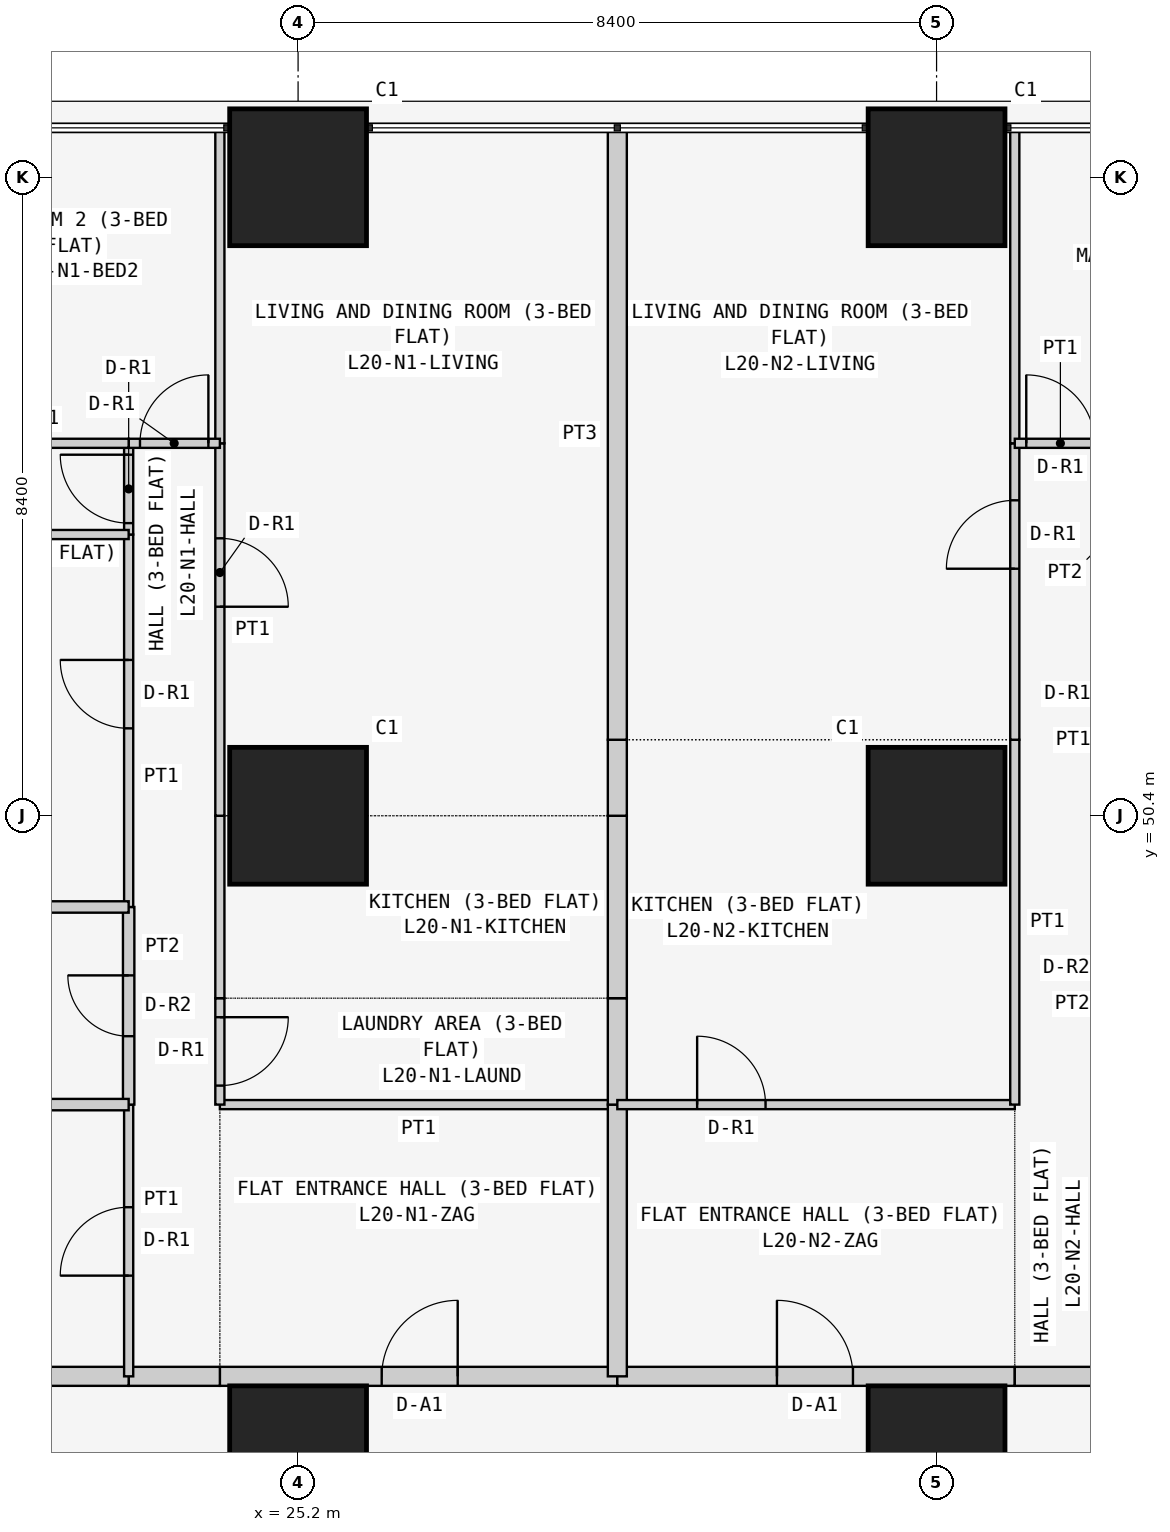
"""IFC4 building model, lengths in metres.
Left out: names, types, materials, properties, quantities, classifications, styles, units other than length and angle.
Written with IfcOpenShell. Run it as: python <this file> out.ifc"""

import sys

from ifc_helpers import new_model, si_unit, direction, frame, frame_2d, origin, origin_2d, place, context, subcontext, project, spatial, rectangle, extrude, element, fill, save


model = new_model("IFC4")
c1 = context("Model", 3, precision=1e-05, world=origin(), true_north=direction((0.0, 1.0)))
c2 = subcontext(c1, "Body", "Model", "MODEL_VIEW")
j1 = project(units=[si_unit("LENGTHUNIT", "METRE"), si_unit("PLANEANGLEUNIT", "RADIAN")], contexts=[c1])
p1 = place(None, origin())
s1 = spatial("IfcSite", under=j1, at=p1, CompositionType="ELEMENT")
p2 = place(p1, origin())
s2 = spatial("IfcBuilding", under=s1, at=p2, CompositionType="ELEMENT")
p3 = place(p2, frame((0.0, 0.0, 81.3)))
s3 = spatial("IfcBuildingStorey", under=s2, at=p3, CompositionType="ELEMENT", Elevation=81.3)
for number, where, z_axis, x_axis in (
    (1, (25.2, 42.0, 0.0), (0.0, 0.0, 1.0), (1.0, 0.0, 0.0)),
    (2, (25.2, 50.4, 0.0), (0.0, 0.0, 1.0), (1.0, 0.0, 0.0)),
    (3, (25.2, 58.8, 0.0), (0.0, 0.0, 1.0), (1.0, 0.0, 0.0)),
    (4, (33.6, 42.0, 0.0), (0.0, 0.0, 1.0), (1.0, 0.0, 0.0)),
    (5, (33.6, 50.4, 0.0), (0.0, 0.0, 1.0), (1.0, 0.0, 0.0)),
    (6, (33.6, 58.8, 0.0), (0.0, 0.0, 1.0), (1.0, 0.0, 0.0)),
):
    element("IfcColumn", number, at=place(p3, frame(where, z_axis=z_axis, x_axis=x_axis)), inside=s3, PredefinedType="COLUMN", context=c2, shape_type="SweptSolid", body=[
        extrude(rectangle(XDim=1.8, YDim=1.8, at=origin_2d()), origin(), (0.0, 0.0, 1.0), 3.6),
    ])
p4 = place(p3, frame((24.171, 43.025, 0.0), z_axis=(0.0, 0.0, 1.0), x_axis=(1.0, 0.0, 0.0)))
e7 = element("IfcWall", 7, at=p4, inside=s3, PredefinedType="PARTITIONING", context=c2, shape_type="SweptSolid", body=[
    extrude(rectangle(XDim=5.229, YDim=0.25, at=frame_2d((2.615, 0.0))), origin(), (0.0, 0.0, 1.0), 3.45),
])
p5 = place(p4, frame((2.129, 0.0, 0.0)))
e8 = element("IfcOpeningElement", 8, at=p5, cuts=e7, PredefinedType="OPENING", context=c2, shape_type="SweptSolid", body=[
    extrude(rectangle(XDim=1.0, YDim=2.1, at=frame_2d((0.5, 1.05))), frame((0.0, 0.135, 0.0), z_axis=(0.0, -1.0, 0.0), x_axis=(1.0, 0.0, 0.0)), (0.0, 0.0, 1.0), 0.27),
])
p6 = place(p3, frame((22.971, 43.025, 0.0), z_axis=(0.0, 0.0, 1.0), x_axis=(1.0, 0.0, 0.0)))
e9 = element("IfcWall", 9, at=p6, inside=s3, PredefinedType="PARTITIONING", context=c2, shape_type="SweptSolid", body=[
    extrude(rectangle(XDim=1.2, YDim=0.25, at=frame_2d((0.6, 0.0))), origin(), (0.0, 0.0, 1.0), 3.45),
])
p7 = place(p3, frame((16.1, 43.025, 0.0), z_axis=(0.0, 0.0, 1.0), x_axis=(1.0, 0.0, 0.0)))
e10 = element("IfcWall", 10, at=p7, inside=s3, PredefinedType="PARTITIONING", context=c2, shape_type="SweptSolid", body=[
    extrude(rectangle(XDim=6.871, YDim=0.25, at=frame_2d((3.436, 0.0))), origin(), (0.0, 0.0, 1.0), 3.45),
])
p8 = place(p3, frame((29.4, 43.025, 0.0), z_axis=(0.0, 0.0, 1.0), x_axis=(1.0, 0.0, 0.0)))
e11 = element("IfcWall", 11, at=p8, inside=s3, PredefinedType="PARTITIONING", context=c2, shape_type="SweptSolid", body=[
    extrude(rectangle(XDim=5.229, YDim=0.25, at=frame_2d((2.615, 0.0))), origin(), (0.0, 0.0, 1.0), 3.45),
])
p9 = place(p8, frame((2.1, 0.0, 0.0)))
e12 = element("IfcOpeningElement", 12, at=p9, cuts=e11, PredefinedType="OPENING", context=c2, shape_type="SweptSolid", body=[
    extrude(rectangle(XDim=1.0, YDim=2.1, at=frame_2d((0.5, 1.05))), frame((0.0, 0.135, 0.0), z_axis=(0.0, -1.0, 0.0), x_axis=(1.0, 0.0, 0.0)), (0.0, 0.0, 1.0), 0.27),
])
p10 = place(p3, frame((34.629, 43.025, 0.0), z_axis=(0.0, 0.0, 1.0), x_axis=(1.0, 0.0, 0.0)))
e13 = element("IfcWall", 13, at=p10, inside=s3, PredefinedType="PARTITIONING", context=c2, shape_type="SweptSolid", body=[
    extrude(rectangle(XDim=1.2, YDim=0.25, at=frame_2d((0.6, 0.0))), origin(), (0.0, 0.0, 1.0), 3.45),
])
p11 = place(p3, frame((29.4, 46.6, 0.0), z_axis=(0.0, 0.0, 1.0), x_axis=(-1.0, 0.0, 0.0)))
e14 = element("IfcWall", 14, at=p11, inside=s3, PredefinedType="PARTITIONING", context=c2, shape_type="SweptSolid", body=[
    extrude(rectangle(XDim=5.229, YDim=0.12, at=frame_2d((2.615, 0.0))), origin(), (0.0, 0.0, 1.0), 3.45),
])
p12 = place(p3, frame((29.4, 43.025, 0.0), z_axis=(0.0, 0.0, 1.0), x_axis=(0.0, 1.0, 0.0)))
e15 = element("IfcWall", 15, at=p12, inside=s3, PredefinedType="PARTITIONING", context=c2, shape_type="SweptSolid", body=[
    extrude(rectangle(XDim=3.575, YDim=0.25, at=frame_2d((1.788, 0.0))), origin(), (0.0, 0.0, 1.0), 2.848),
])
p13 = place(p3, frame((24.171, 48.0, 0.0), z_axis=(0.0, 0.0, 1.0), x_axis=(0.0, -1.0, 0.0)))
e16 = element("IfcWall", 16, at=p13, inside=s3, PredefinedType="PARTITIONING", context=c2, shape_type="SweptSolid", body=[
    extrude(rectangle(XDim=1.4, YDim=0.12, at=frame_2d((0.7, 0.0))), origin(), (0.0, 0.0, 1.0), 3.45),
])
p14 = place(p13, frame((0.25, 0.0, 0.0)))
e17 = element("IfcOpeningElement", 17, at=p14, cuts=e16, PredefinedType="OPENING", context=c2, shape_type="SweptSolid", body=[
    extrude(rectangle(XDim=0.9, YDim=2.1, at=frame_2d((0.45, 1.05))), frame((0.0, 0.07, 0.0), z_axis=(0.0, -1.0, 0.0), x_axis=(1.0, 0.0, 0.0)), (0.0, 0.0, 1.0), 0.14),
])
p15 = place(p3, frame((29.4, 46.6, 0.0), z_axis=(0.0, 0.0, 1.0), x_axis=(0.0, 1.0, 0.0)))
e18 = element("IfcWall", 18, at=p15, inside=s3, PredefinedType="PARTITIONING", context=c2, shape_type="SweptSolid", body=[
    extrude(rectangle(XDim=1.4, YDim=0.25, at=frame_2d((0.7, 0.0))), origin(), (0.0, 0.0, 1.0), 2.848),
])
p16 = place(p3, frame((24.171, 50.4, 0.0), z_axis=(0.0, 0.0, 1.0), x_axis=(0.0, -1.0, 0.0)))
e19 = element("IfcWall", 19, at=p16, inside=s3, PredefinedType="PARTITIONING", context=c2, shape_type="SweptSolid", body=[
    extrude(rectangle(XDim=2.4, YDim=0.12, at=frame_2d((1.2, 0.0))), origin(), (0.0, 0.0, 1.0), 3.45),
])
p17 = place(p3, frame((29.4, 48.0, 0.0), z_axis=(0.0, 0.0, 1.0), x_axis=(0.0, 1.0, 0.0)))
e20 = element("IfcWall", 20, at=p17, inside=s3, PredefinedType="PARTITIONING", context=c2, shape_type="SweptSolid", body=[
    extrude(rectangle(XDim=2.4, YDim=0.25, at=frame_2d((1.2, 0.0))), origin(), (0.0, 0.0, 1.0), 2.848),
])
p18 = place(p3, frame((24.171, 55.3, 0.0), z_axis=(0.0, 0.0, 1.0), x_axis=(0.0, -1.0, 0.0)))
e21 = element("IfcWall", 21, at=p18, inside=s3, PredefinedType="PARTITIONING", context=c2, shape_type="SweptSolid", body=[
    extrude(rectangle(XDim=4.9, YDim=0.12, at=frame_2d((2.45, 0.0))), origin(), (0.0, 0.0, 1.0), 3.45),
])
p19 = place(p18, frame((1.25, 0.0, 0.0)))
e22 = element("IfcOpeningElement", 22, at=p19, cuts=e21, PredefinedType="OPENING", context=c2, shape_type="SweptSolid", body=[
    extrude(rectangle(XDim=0.9, YDim=2.1, at=frame_2d((0.45, 1.05))), frame((0.0, 0.07, 0.0), z_axis=(0.0, -1.0, 0.0), x_axis=(1.0, 0.0, 0.0)), (0.0, 0.0, 1.0), 0.14),
])
p20 = place(p3, frame((24.171, 59.45, 0.0), z_axis=(0.0, 0.0, 1.0), x_axis=(0.0, -1.0, 0.0)))
e23 = element("IfcWall", 23, at=p20, inside=s3, PredefinedType="PARTITIONING", context=c2, shape_type="SweptSolid", body=[
    extrude(rectangle(XDim=4.15, YDim=0.12, at=frame_2d((2.075, 0.0))), origin(), (0.0, 0.0, 1.0), 3.45),
])
p21 = place(p3, frame((29.4, 50.4, 0.0), z_axis=(0.0, 0.0, 1.0), x_axis=(0.0, 1.0, 0.0)))
e24 = element("IfcWall", 24, at=p21, inside=s3, PredefinedType="PARTITIONING", context=c2, shape_type="SweptSolid", body=[
    extrude(rectangle(XDim=1.0, YDim=0.25, at=frame_2d((0.5, 0.0))), origin(), (0.0, 0.0, 1.0), 2.848),
])
p22 = place(p3, frame((29.4, 51.4, 0.0), z_axis=(0.0, 0.0, 1.0), x_axis=(0.0, 1.0, 0.0)))
e25 = element("IfcWall", 25, at=p22, inside=s3, PredefinedType="PARTITIONING", context=c2, shape_type="SweptSolid", body=[
    extrude(rectangle(XDim=8.05, YDim=0.25, at=frame_2d((4.025, 0.0))), origin(), (0.0, 0.0, 1.0), 2.848),
])
p23 = place(p3, frame((22.971, 46.6, 0.0), z_axis=(0.0, 0.0, 1.0), x_axis=(0.0, -1.0, 0.0)))
e26 = element("IfcWall", 26, at=p23, inside=s3, PredefinedType="PARTITIONING", context=c2, shape_type="SweptSolid", body=[
    extrude(rectangle(XDim=3.575, YDim=0.12, at=frame_2d((1.788, 0.0))), origin(), (0.0, 0.0, 1.0), 3.45),
])
p24 = place(p23, frame((1.35, 0.0, 0.0)))
e27 = element("IfcOpeningElement", 27, at=p24, cuts=e26, PredefinedType="OPENING", context=c2, shape_type="SweptSolid", body=[
    extrude(rectangle(XDim=0.9, YDim=2.1, at=frame_2d((0.45, 1.05))), frame((0.0, 0.07, 0.0), z_axis=(0.0, -1.0, 0.0), x_axis=(1.0, 0.0, 0.0)), (0.0, 0.0, 1.0), 0.14),
])
p25 = place(p3, frame((22.971, 49.2, 0.0), z_axis=(0.0, 0.0, 1.0), x_axis=(0.0, -1.0, 0.0)))
e28 = element("IfcWall", 28, at=p25, inside=s3, PredefinedType="PARTITIONING", context=c2, shape_type="SweptSolid", body=[
    extrude(rectangle(XDim=2.6, YDim=0.15, at=frame_2d((1.3, 0.0))), origin(), (0.0, 0.0, 1.0), 3.45),
])
p26 = place(p25, frame((0.9, 0.0, 0.0)))
e29 = element("IfcOpeningElement", 29, at=p26, cuts=e28, PredefinedType="OPENING", context=c2, shape_type="SweptSolid", body=[
    extrude(rectangle(XDim=0.8, YDim=2.1, at=frame_2d((0.4, 1.05))), frame((0.0, 0.085, 0.0), z_axis=(0.0, -1.0, 0.0), x_axis=(1.0, 0.0, 0.0)), (0.0, 0.0, 1.0), 0.17),
])
p27 = place(p3, frame((22.971, 54.1, 0.0), z_axis=(0.0, 0.0, 1.0), x_axis=(0.0, -1.0, 0.0)))
e30 = element("IfcWall", 30, at=p27, inside=s3, PredefinedType="PARTITIONING", context=c2, shape_type="SweptSolid", body=[
    extrude(rectangle(XDim=4.9, YDim=0.12, at=frame_2d((2.45, 0.0))), origin(), (0.0, 0.0, 1.0), 3.45),
])
p28 = place(p27, frame((1.65, 0.0, 0.0)))
e31 = element("IfcOpeningElement", 31, at=p28, cuts=e30, PredefinedType="OPENING", context=c2, shape_type="SweptSolid", body=[
    extrude(rectangle(XDim=0.9, YDim=2.1, at=frame_2d((0.45, 1.05))), frame((0.0, 0.07, 0.0), z_axis=(0.0, -1.0, 0.0), x_axis=(1.0, 0.0, 0.0)), (0.0, 0.0, 1.0), 0.14),
])
p29 = place(p3, frame((22.971, 55.3, 0.0), z_axis=(0.0, 0.0, 1.0), x_axis=(0.0, -1.0, 0.0)))
e32 = element("IfcWall", 32, at=p29, inside=s3, PredefinedType="PARTITIONING", context=c2, shape_type="SweptSolid", body=[
    extrude(rectangle(XDim=1.2, YDim=0.12, at=frame_2d((0.6, 0.0))), origin(), (0.0, 0.0, 1.0), 3.45),
])
p30 = place(p29, frame((0.15, 0.0, 0.0)))
e33 = element("IfcOpeningElement", 33, at=p30, cuts=e32, PredefinedType="OPENING", context=c2, shape_type="SweptSolid", body=[
    extrude(rectangle(XDim=0.9, YDim=2.1, at=frame_2d((0.45, 1.05))), frame((0.0, 0.07, 0.0), z_axis=(0.0, -1.0, 0.0), x_axis=(1.0, 0.0, 0.0)), (0.0, 0.0, 1.0), 0.14),
])
p31 = place(p3, frame((24.171, 55.3, 0.0), z_axis=(0.0, 0.0, 1.0), x_axis=(-1.0, 0.0, 0.0)))
e34 = element("IfcWall", 34, at=p31, inside=s3, PredefinedType="PARTITIONING", context=c2, shape_type="SweptSolid", body=[
    extrude(rectangle(XDim=1.2, YDim=0.12, at=frame_2d((0.6, 0.0))), origin(), (0.0, 0.0, 1.0), 3.45),
])
p32 = place(p31, frame((0.151, 0.0, 0.0)))
e35 = element("IfcOpeningElement", 35, at=p32, cuts=e34, PredefinedType="OPENING", context=c2, shape_type="SweptSolid", body=[
    extrude(rectangle(XDim=0.9, YDim=2.1, at=frame_2d((0.45, 1.05))), frame((0.0, 0.07, 0.0), z_axis=(0.0, -1.0, 0.0), x_axis=(1.0, 0.0, 0.0)), (0.0, 0.0, 1.0), 0.14),
])
for number, where, z_axis, x_axis in (
    (36, (22.971, 46.6, 0.0), (0.0, 0.0, 1.0), (-1.0, 0.0, 0.0)),
    (37, (22.971, 49.2, 0.0), (0.0, 0.0, 1.0), (-1.0, 0.0, 0.0)),
):
    element("IfcWall", number, at=place(p3, frame(where, z_axis=z_axis, x_axis=x_axis)), inside=s3, PredefinedType="PARTITIONING", context=c2, shape_type="SweptSolid", body=[
        extrude(rectangle(XDim=2.971, YDim=0.15, at=frame_2d((1.485, 0.0))), origin(), (0.0, 0.0, 1.0), 3.45),
    ])
for number, where, z_axis, x_axis in (
    (38, (22.971, 54.1, 0.0), (0.0, 0.0, 1.0), (-1.0, 0.0, 0.0)),
    (39, (22.971, 55.3, 0.0), (0.0, 0.0, 1.0), (-1.0, 0.0, 0.0)),
):
    element("IfcWall", number, at=place(p3, frame(where, z_axis=z_axis, x_axis=x_axis)), inside=s3, PredefinedType="PARTITIONING", context=c2, shape_type="SweptSolid", body=[
        extrude(rectangle(XDim=2.285, YDim=0.12, at=frame_2d((1.143, 0.0))), origin(), (0.0, 0.0, 1.0), 3.45),
    ])
p33 = place(p3, frame((29.4, 46.6, 0.0), z_axis=(0.0, 0.0, 1.0), x_axis=(1.0, 0.0, 0.0)))
e40 = element("IfcWall", 40, at=p33, inside=s3, PredefinedType="PARTITIONING", context=c2, shape_type="SweptSolid", body=[
    extrude(rectangle(XDim=5.229, YDim=0.12, at=frame_2d((2.615, 0.0))), origin(), (0.0, 0.0, 1.0), 3.45),
])
p34 = place(p33, frame((1.05, 0.0, 0.0)))
e41 = element("IfcOpeningElement", 41, at=p34, cuts=e40, PredefinedType="OPENING", context=c2, shape_type="SweptSolid", body=[
    extrude(rectangle(XDim=0.9, YDim=2.1, at=frame_2d((0.45, 1.05))), frame((0.0, 0.07, 0.0), z_axis=(0.0, -1.0, 0.0), x_axis=(1.0, 0.0, 0.0)), (0.0, 0.0, 1.0), 0.14),
])
p35 = place(p3, frame((34.629, 51.4, 0.0), z_axis=(0.0, 0.0, 1.0), x_axis=(0.0, -1.0, 0.0)))
e42 = element("IfcWall", 42, at=p35, inside=s3, PredefinedType="PARTITIONING", context=c2, shape_type="SweptSolid", body=[
    extrude(rectangle(XDim=4.8, YDim=0.12, at=frame_2d((2.4, 0.0))), origin(), (0.0, 0.0, 1.0), 3.45),
])
p36 = place(p3, frame((34.629, 55.3, 0.0), z_axis=(0.0, 0.0, 1.0), x_axis=(0.0, -1.0, 0.0)))
e43 = element("IfcWall", 43, at=p36, inside=s3, PredefinedType="PARTITIONING", context=c2, shape_type="SweptSolid", body=[
    extrude(rectangle(XDim=3.9, YDim=0.12, at=frame_2d((1.95, 0.0))), origin(), (0.0, 0.0, 1.0), 3.45),
])
p37 = place(p36, frame((0.75, 0.0, 0.0)))
e44 = element("IfcOpeningElement", 44, at=p37, cuts=e43, PredefinedType="OPENING", context=c2, shape_type="SweptSolid", body=[
    extrude(rectangle(XDim=0.9, YDim=2.1, at=frame_2d((0.45, 1.05))), frame((0.0, 0.07, 0.0), z_axis=(0.0, -1.0, 0.0), x_axis=(1.0, 0.0, 0.0)), (0.0, 0.0, 1.0), 0.14),
])
p38 = place(p3, frame((34.629, 59.45, 0.0), z_axis=(0.0, 0.0, 1.0), x_axis=(0.0, -1.0, 0.0)))
e45 = element("IfcWall", 45, at=p38, inside=s3, PredefinedType="PARTITIONING", context=c2, shape_type="SweptSolid", body=[
    extrude(rectangle(XDim=4.15, YDim=0.12, at=frame_2d((2.075, 0.0))), origin(), (0.0, 0.0, 1.0), 3.45),
])
p39 = place(p3, frame((34.629, 55.3, 0.0), z_axis=(0.0, 0.0, 1.0), x_axis=(1.0, 0.0, 0.0)))
e46 = element("IfcWall", 46, at=p39, inside=s3, PredefinedType="PARTITIONING", context=c2, shape_type="SweptSolid", body=[
    extrude(rectangle(XDim=1.2, YDim=0.12, at=frame_2d((0.6, 0.0))), origin(), (0.0, 0.0, 1.0), 3.45),
])
p40 = place(p39, frame((0.151, 0.0, 0.0)))
e47 = element("IfcOpeningElement", 47, at=p40, cuts=e46, PredefinedType="OPENING", context=c2, shape_type="SweptSolid", body=[
    extrude(rectangle(XDim=0.9, YDim=2.1, at=frame_2d((0.45, 1.05))), frame((0.0, 0.07, 0.0), z_axis=(0.0, -1.0, 0.0), x_axis=(1.0, 0.0, 0.0)), (0.0, 0.0, 1.0), 0.14),
])
p41 = place(p5, origin())
e48 = element("IfcDoor", 48, at=p41, inside=s3, OperationType="SINGLE_SWING_RIGHT", PredefinedType="DOOR", context=c2, shape_type="SweptSolid", body=[
    extrude(rectangle(XDim=1.0, YDim=2.1, at=frame_2d((0.5, 1.05))), frame((0.0, 0.025, 0.0), z_axis=(0.0, -1.0, 0.0), x_axis=(1.0, 0.0, 0.0)), (0.0, 0.0, 1.0), 0.05),
])
fill(e8, e48)
p42 = place(p14, origin())
e49 = element("IfcDoor", 49, at=p42, inside=s3, OperationType="SINGLE_SWING_LEFT", PredefinedType="DOOR", context=c2, shape_type="SweptSolid", body=[
    extrude(rectangle(XDim=0.9, YDim=2.1, at=frame_2d((0.45, 1.05))), frame((0.0, 0.025, 0.0), z_axis=(0.0, -1.0, 0.0), x_axis=(1.0, 0.0, 0.0)), (0.0, 0.0, 1.0), 0.05),
])
fill(e17, e49)
p43 = place(p19, origin())
e50 = element("IfcDoor", 50, at=p43, inside=s3, OperationType="SINGLE_SWING_RIGHT", PredefinedType="DOOR", context=c2, shape_type="SweptSolid", body=[
    extrude(rectangle(XDim=0.9, YDim=2.1, at=frame_2d((0.45, 1.05))), frame((0.0, 0.025, 0.0), z_axis=(0.0, -1.0, 0.0), x_axis=(1.0, 0.0, 0.0)), (0.0, 0.0, 1.0), 0.05),
])
fill(e22, e50)
p44 = place(p24, frame((0.9, 0.0, 0.0), z_axis=(0.0, 0.0, 1.0), x_axis=(-1.0, 0.0, 0.0)))
e51 = element("IfcDoor", 51, at=p44, inside=s3, OperationType="SINGLE_SWING_LEFT", PredefinedType="DOOR", context=c2, shape_type="SweptSolid", body=[
    extrude(rectangle(XDim=0.9, YDim=2.1, at=frame_2d((0.45, 1.05))), frame((0.0, 0.025, 0.0), z_axis=(0.0, -1.0, 0.0), x_axis=(1.0, 0.0, 0.0)), (0.0, 0.0, 1.0), 0.05),
])
fill(e27, e51)
p45 = place(p26, frame((0.8, 0.0, 0.0), z_axis=(0.0, 0.0, 1.0), x_axis=(-1.0, 0.0, 0.0)))
e52 = element("IfcDoor", 52, at=p45, inside=s3, OperationType="SINGLE_SWING_RIGHT", PredefinedType="DOOR", context=c2, shape_type="SweptSolid", body=[
    extrude(rectangle(XDim=0.8, YDim=2.1, at=frame_2d((0.4, 1.05))), frame((0.0, 0.025, 0.0), z_axis=(0.0, -1.0, 0.0), x_axis=(1.0, 0.0, 0.0)), (0.0, 0.0, 1.0), 0.05),
])
fill(e29, e52)
p46 = place(p28, frame((0.9, 0.0, 0.0), z_axis=(0.0, 0.0, 1.0), x_axis=(-1.0, 0.0, 0.0)))
e53 = element("IfcDoor", 53, at=p46, inside=s3, OperationType="SINGLE_SWING_RIGHT", PredefinedType="DOOR", context=c2, shape_type="SweptSolid", body=[
    extrude(rectangle(XDim=0.9, YDim=2.1, at=frame_2d((0.45, 1.05))), frame((0.0, 0.025, 0.0), z_axis=(0.0, -1.0, 0.0), x_axis=(1.0, 0.0, 0.0)), (0.0, 0.0, 1.0), 0.05),
])
fill(e31, e53)
p47 = place(p30, frame((0.9, 0.0, 0.0), z_axis=(0.0, 0.0, 1.0), x_axis=(-1.0, 0.0, 0.0)))
e54 = element("IfcDoor", 54, at=p47, inside=s3, OperationType="SINGLE_SWING_RIGHT", PredefinedType="DOOR", context=c2, shape_type="SweptSolid", body=[
    extrude(rectangle(XDim=0.9, YDim=2.1, at=frame_2d((0.45, 1.05))), frame((0.0, 0.025, 0.0), z_axis=(0.0, -1.0, 0.0), x_axis=(1.0, 0.0, 0.0)), (0.0, 0.0, 1.0), 0.05),
])
fill(e33, e54)
p48 = place(p32, frame((0.9, 0.0, 0.0), z_axis=(0.0, 0.0, 1.0), x_axis=(-1.0, 0.0, 0.0)))
e55 = element("IfcDoor", 55, at=p48, inside=s3, OperationType="SINGLE_SWING_RIGHT", PredefinedType="DOOR", context=c2, shape_type="SweptSolid", body=[
    extrude(rectangle(XDim=0.9, YDim=2.1, at=frame_2d((0.45, 1.05))), frame((0.0, 0.025, 0.0), z_axis=(0.0, -1.0, 0.0), x_axis=(1.0, 0.0, 0.0)), (0.0, 0.0, 1.0), 0.05),
])
fill(e35, e55)
p49 = place(p9, origin())
e56 = element("IfcDoor", 56, at=p49, inside=s3, OperationType="SINGLE_SWING_LEFT", PredefinedType="DOOR", context=c2, shape_type="SweptSolid", body=[
    extrude(rectangle(XDim=1.0, YDim=2.1, at=frame_2d((0.5, 1.05))), frame((0.0, 0.025, 0.0), z_axis=(0.0, -1.0, 0.0), x_axis=(1.0, 0.0, 0.0)), (0.0, 0.0, 1.0), 0.05),
])
fill(e12, e56)
p50 = place(p34, origin())
e57 = element("IfcDoor", 57, at=p50, inside=s3, OperationType="SINGLE_SWING_LEFT", PredefinedType="DOOR", context=c2, shape_type="SweptSolid", body=[
    extrude(rectangle(XDim=0.9, YDim=2.1, at=frame_2d((0.45, 1.05))), frame((0.0, 0.025, 0.0), z_axis=(0.0, -1.0, 0.0), x_axis=(1.0, 0.0, 0.0)), (0.0, 0.0, 1.0), 0.05),
])
fill(e41, e57)
p51 = place(p37, frame((0.9, 0.0, 0.0), z_axis=(0.0, 0.0, 1.0), x_axis=(-1.0, 0.0, 0.0)))
e58 = element("IfcDoor", 58, at=p51, inside=s3, OperationType="SINGLE_SWING_LEFT", PredefinedType="DOOR", context=c2, shape_type="SweptSolid", body=[
    extrude(rectangle(XDim=0.9, YDim=2.1, at=frame_2d((0.45, 1.05))), frame((0.0, 0.025, 0.0), z_axis=(0.0, -1.0, 0.0), x_axis=(1.0, 0.0, 0.0)), (0.0, 0.0, 1.0), 0.05),
])
fill(e44, e58)
p52 = place(p40, origin())
e59 = element("IfcDoor", 59, at=p52, inside=s3, OperationType="SINGLE_SWING_LEFT", PredefinedType="DOOR", context=c2, shape_type="SweptSolid", body=[
    extrude(rectangle(XDim=0.9, YDim=2.1, at=frame_2d((0.45, 1.05))), frame((0.0, 0.025, 0.0), z_axis=(0.0, -1.0, 0.0), x_axis=(1.0, 0.0, 0.0)), (0.0, 0.0, 1.0), 0.05),
])
fill(e47, e59)
save(model, sys.argv[1])
